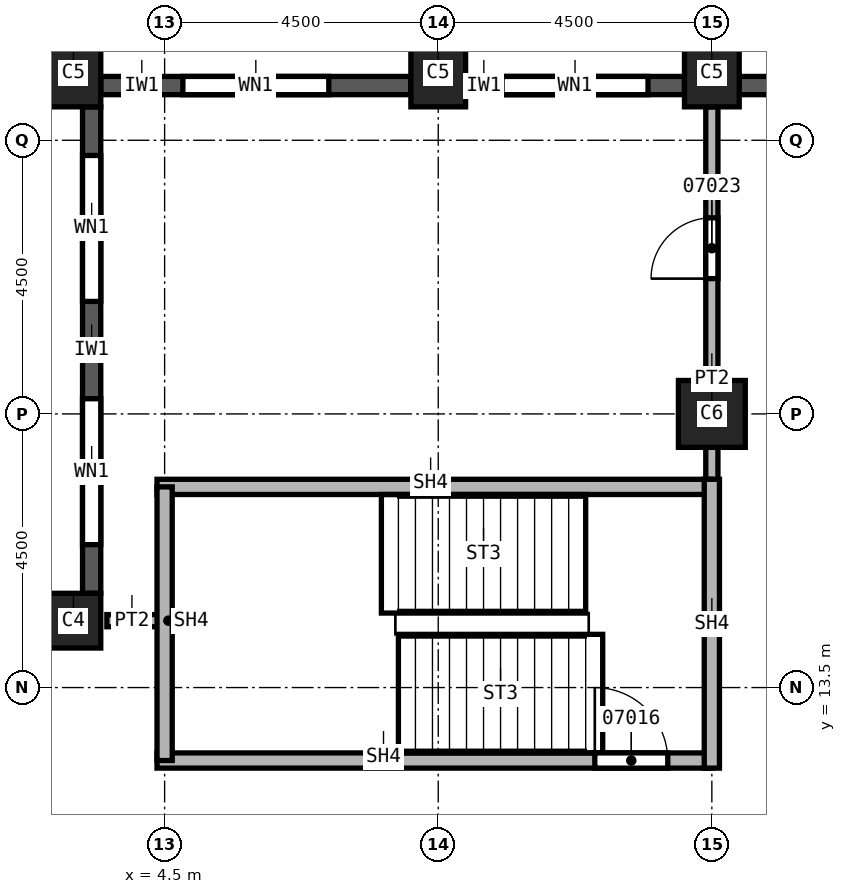
"""IFC4 building model, lengths in metres.
Left out: names, types, materials, properties, quantities, classifications, styles, units other than length and angle.
Written with IfcOpenShell. Run it as: python <this file> out.ifc"""

import sys

from ifc_helpers import new_model, si_unit, direction, frame, frame_2d, origin, origin_2d, place, context, subcontext, project, spatial, rectangle, extrude, element, fill, save


model = new_model("IFC4")
c1 = context("Model", 3, precision=1e-05, world=origin(), true_north=direction((0.0, 1.0)))
c2 = subcontext(c1, "Body", "Model", "MODEL_VIEW")
j1 = project(units=[si_unit("LENGTHUNIT", "METRE"), si_unit("PLANEANGLEUNIT", "RADIAN")], contexts=[c1])
p1 = place(None, origin())
s1 = spatial("IfcSite", under=j1, at=p1, CompositionType="ELEMENT")
p2 = place(p1, origin())
s2 = spatial("IfcBuilding", under=s1, at=p2, CompositionType="ELEMENT")
p3 = place(p2, frame((0.0, 0.0, 138.0)))
s3 = spatial("IfcBuildingStorey", under=s2, at=p3, CompositionType="ELEMENT", Elevation=138.0)
p4 = place(p3, frame((13.5, 18.0, 0.0), z_axis=(0.0, 0.0, 1.0), x_axis=(1.0, 0.0, 0.0)))
e1 = element("IfcColumn", 1, at=p4, inside=s3, PredefinedType="COLUMN", context=c2, shape_type="SweptSolid", body=[
    extrude(rectangle(XDim=1.1, YDim=1.1, at=origin_2d()), origin(), (0.0, 0.0, 1.0), 3.7),
])
for number, where, z_axis, x_axis in (
    (2, (3.0, 23.6, 0.0), (0.0, 0.0, 1.0), (1.0, 0.0, 0.0)),
    (3, (9.0, 23.6, 0.0), (0.0, 0.0, 1.0), (1.0, 0.0, 0.0)),
    (4, (13.5, 23.6, 0.0), (0.0, 0.0, 1.0), (1.0, 0.0, 0.0)),
):
    element("IfcColumn", number, at=place(p3, frame(where, z_axis=z_axis, x_axis=x_axis)), inside=s3, PredefinedType="COLUMN", context=c2, shape_type="SweptSolid", body=[
        extrude(rectangle(XDim=0.9, YDim=1.1, at=origin_2d()), origin(), (0.0, 0.0, 1.0), 3.7),
    ])
p5 = place(p3, frame((3.0, 14.6, 0.0), z_axis=(0.0, 0.0, 1.0), x_axis=(1.0, 0.0, 0.0)))
e5 = element("IfcColumn", 5, at=p5, inside=s3, PredefinedType="COLUMN", context=c2, shape_type="SweptSolid", body=[
    extrude(rectangle(XDim=0.9, YDim=0.9, at=origin_2d()), origin(), (0.0, 0.0, 1.0), 3.7),
])
p6 = place(p3, frame((17.55, 23.4, 0.0), z_axis=(0.0, 0.0, 1.0), x_axis=(-1.0, 0.0, 0.0)))
e6 = element("IfcWall", 6, at=p6, inside=s3, PredefinedType="SOLIDWALL", context=c2, shape_type="SweptSolid", body=[
    extrude(rectangle(XDim=3.6, YDim=0.3, at=frame_2d((1.8, 0.0))), origin(), (0.0, 0.0, 1.0), 3.1),
])
p7 = place(p6, frame((0.775, 0.0, 0.8)))
e7 = element("IfcOpeningElement", 7, at=p7, cuts=e6, PredefinedType="OPENING", context=c2, shape_type="SweptSolid", body=[
    extrude(rectangle(XDim=1.0, YDim=1.95, at=frame_2d((0.5, 0.975))), frame((0.0, 0.15, 0.0), z_axis=(0.0, -1.0, 0.0), x_axis=(1.0, 0.0, 0.0)), (0.0, 0.0, 1.0), 0.3),
])
p8 = place(p6, frame((2.375, 0.0, 0.8)))
e8 = element("IfcOpeningElement", 8, at=p8, cuts=e6, PredefinedType="OPENING", context=c2, shape_type="SweptSolid", body=[
    extrude(rectangle(XDim=0.6, YDim=1.95, at=frame_2d((0.3, 0.975))), frame((0.0, 0.15, 0.0), z_axis=(0.0, -1.0, 0.0), x_axis=(1.0, 0.0, 0.0)), (0.0, 0.0, 1.0), 0.3),
])
p9 = place(p3, frame((13.05, 23.4, 0.0), z_axis=(0.0, 0.0, 1.0), x_axis=(-1.0, 0.0, 0.0)))
e9 = element("IfcWall", 9, at=p9, inside=s3, PredefinedType="SOLIDWALL", context=c2, shape_type="SweptSolid", body=[
    extrude(rectangle(XDim=3.6, YDim=0.3, at=frame_2d((1.8, 0.0))), origin(), (0.0, 0.0, 1.0), 3.1),
])
p10 = place(p9, frame((0.6, 0.0, 0.8)))
e10 = element("IfcOpeningElement", 10, at=p10, cuts=e9, PredefinedType="OPENING", context=c2, shape_type="SweptSolid", body=[
    extrude(rectangle(XDim=2.4, YDim=1.95, at=frame_2d((1.2, 0.975))), frame((0.0, 0.15, 0.0), z_axis=(0.0, -1.0, 0.0), x_axis=(1.0, 0.0, 0.0)), (0.0, 0.0, 1.0), 0.3),
])
p11 = place(p3, frame((8.55, 23.4, 0.0), z_axis=(0.0, 0.0, 1.0), x_axis=(-1.0, 0.0, 0.0)))
e11 = element("IfcWall", 11, at=p11, inside=s3, PredefinedType="SOLIDWALL", context=c2, shape_type="SweptSolid", body=[
    extrude(rectangle(XDim=5.1, YDim=0.3, at=frame_2d((2.55, 0.0))), origin(), (0.0, 0.0, 1.0), 3.1),
])
p12 = place(p11, frame((1.35, 0.0, 0.8)))
e12 = element("IfcOpeningElement", 12, at=p12, cuts=e11, PredefinedType="OPENING", context=c2, shape_type="SweptSolid", body=[
    extrude(rectangle(XDim=2.4, YDim=1.95, at=frame_2d((1.2, 0.975))), frame((0.0, 0.15, 0.0), z_axis=(0.0, -1.0, 0.0), x_axis=(1.0, 0.0, 0.0)), (0.0, 0.0, 1.0), 0.3),
])
p13 = place(p3, frame((3.3, 23.05, 0.0), z_axis=(0.0, 0.0, 1.0), x_axis=(0.0, -1.0, 0.0)))
e13 = element("IfcWall", 13, at=p13, inside=s3, PredefinedType="SOLIDWALL", context=c2, shape_type="SweptSolid", body=[
    extrude(rectangle(XDim=8.0, YDim=0.3, at=frame_2d((4.0, 0.0))), origin(), (0.0, 0.0, 1.0), 3.1),
])
p14 = place(p13, frame((0.8, 0.0, 0.8)))
e14 = element("IfcOpeningElement", 14, at=p14, cuts=e13, PredefinedType="OPENING", context=c2, shape_type="SweptSolid", body=[
    extrude(rectangle(XDim=2.4, YDim=1.95, at=frame_2d((1.2, 0.975))), frame((0.0, 0.15, 0.0), z_axis=(0.0, -1.0, 0.0), x_axis=(1.0, 0.0, 0.0)), (0.0, 0.0, 1.0), 0.3),
])
p15 = place(p13, frame((4.8, 0.0, 0.8)))
e15 = element("IfcOpeningElement", 15, at=p15, cuts=e13, PredefinedType="OPENING", context=c2, shape_type="SweptSolid", body=[
    extrude(rectangle(XDim=2.4, YDim=1.95, at=frame_2d((1.2, 0.975))), frame((0.0, 0.15, 0.0), z_axis=(0.0, -1.0, 0.0), x_axis=(1.0, 0.0, 0.0)), (0.0, 0.0, 1.0), 0.3),
])
p16 = place(p3, frame((3.55, 14.6, 0.0), z_axis=(0.0, 0.0, 1.0), x_axis=(1.0, 0.0, 0.0)))
e16 = element("IfcWall", 16, at=p16, inside=s3, PredefinedType="PARTITIONING", context=c2, shape_type="SweptSolid", body=[
    extrude(rectangle(XDim=0.95, YDim=0.2, at=frame_2d((0.475, 0.0))), origin(), (0.0, 0.0, 1.0), 3.7),
])
p17 = place(p3, frame((13.5, 16.675, 0.0), z_axis=(0.0, 0.0, 1.0), x_axis=(0.0, 1.0, 0.0)))
e17 = element("IfcWall", 17, at=p17, inside=s3, PredefinedType="PARTITIONING", context=c2, shape_type="SweptSolid", body=[
    extrude(rectangle(XDim=6.375, YDim=0.2, at=frame_2d((3.188, 0.0))), origin(), (0.0, 0.0, 1.0), 3.7),
])
p18 = place(p17, frame((3.55, 0.0, 0.0)))
e18 = element("IfcOpeningElement", 18, at=p18, cuts=e17, PredefinedType="OPENING", context=c2, shape_type="SweptSolid", body=[
    extrude(rectangle(XDim=1.0, YDim=2.1, at=frame_2d((0.5, 1.05))), frame((0.0, 0.1, 0.0), z_axis=(0.0, -1.0, 0.0), x_axis=(1.0, 0.0, 0.0)), (0.0, 0.0, 1.0), 0.2),
])
p19 = place(p3, frame((4.375, 12.3, 0.0), z_axis=(0.0, 0.0, 1.0), x_axis=(1.0, 0.0, 0.0)))
e19 = element("IfcWall", 19, at=p19, inside=s3, PredefinedType="SOLIDWALL", context=c2, shape_type="SweptSolid", body=[
    extrude(rectangle(XDim=9.125, YDim=0.25, at=frame_2d((4.562, 0.0))), origin(), (0.0, 0.0, 1.0), 3.7),
])
p20 = place(p19, frame((7.2, 0.0, 0.0)))
e20 = element("IfcOpeningElement", 20, at=p20, cuts=e19, PredefinedType="OPENING", context=c2, shape_type="SweptSolid", body=[
    extrude(rectangle(XDim=1.2, YDim=2.1, at=frame_2d((0.6, 1.05))), frame((0.0, 0.125, 0.0), z_axis=(0.0, -1.0, 0.0), x_axis=(1.0, 0.0, 0.0)), (0.0, 0.0, 1.0), 0.25),
])
p21 = place(p3, frame((4.375, 16.8, 0.0), z_axis=(0.0, 0.0, 1.0), x_axis=(1.0, 0.0, 0.0)))
e21 = element("IfcWall", 21, at=p21, inside=s3, PredefinedType="SOLIDWALL", context=c2, shape_type="SweptSolid", body=[
    extrude(rectangle(XDim=9.125, YDim=0.25, at=frame_2d((4.562, 0.0))), origin(), (0.0, 0.0, 1.0), 3.7),
])
p22 = place(p3, frame((4.5, 12.3, 0.0), z_axis=(0.0, 0.0, 1.0), x_axis=(0.0, 1.0, 0.0)))
e22 = element("IfcWall", 22, at=p22, inside=s3, PredefinedType="SOLIDWALL", context=c2, shape_type="SweptSolid", body=[
    extrude(rectangle(XDim=4.5, YDim=0.25, at=frame_2d((2.25, 0.0))), origin(), (0.0, 0.0, 1.0), 3.7),
])
p23 = place(p3, frame((13.5, 12.175, 0.0), z_axis=(0.0, 0.0, 1.0), x_axis=(0.0, 1.0, 0.0)))
e23 = element("IfcWall", 23, at=p23, inside=s3, PredefinedType="SOLIDWALL", context=c2, shape_type="SweptSolid", body=[
    extrude(rectangle(XDim=4.75, YDim=0.25, at=frame_2d((2.375, 0.0))), origin(), (0.0, 0.0, 1.0), 3.7),
])
p24 = place(p10, origin())
e24 = element("IfcWindow", 24, at=p24, inside=s3, PartitioningType="SINGLE_PANEL", PredefinedType="WINDOW", context=c2, shape_type="SweptSolid", body=[
    extrude(rectangle(XDim=2.4, YDim=1.95, at=frame_2d((1.2, 0.975))), frame((0.0, 0.03, 0.0), z_axis=(0.0, -1.0, 0.0), x_axis=(1.0, 0.0, 0.0)), (0.0, 0.0, 1.0), 0.06),
])
fill(e10, e24)
p25 = place(p12, origin())
e25 = element("IfcWindow", 25, at=p25, inside=s3, PartitioningType="SINGLE_PANEL", PredefinedType="WINDOW", context=c2, shape_type="SweptSolid", body=[
    extrude(rectangle(XDim=2.4, YDim=1.95, at=frame_2d((1.2, 0.975))), frame((0.0, 0.03, 0.0), z_axis=(0.0, -1.0, 0.0), x_axis=(1.0, 0.0, 0.0)), (0.0, 0.0, 1.0), 0.06),
])
fill(e12, e25)
p26 = place(p14, origin())
e26 = element("IfcWindow", 26, at=p26, inside=s3, PartitioningType="SINGLE_PANEL", PredefinedType="WINDOW", context=c2, shape_type="SweptSolid", body=[
    extrude(rectangle(XDim=2.4, YDim=1.95, at=frame_2d((1.2, 0.975))), frame((0.0, 0.03, 0.0), z_axis=(0.0, -1.0, 0.0), x_axis=(1.0, 0.0, 0.0)), (0.0, 0.0, 1.0), 0.06),
])
fill(e14, e26)
p27 = place(p15, origin())
e27 = element("IfcWindow", 27, at=p27, inside=s3, PartitioningType="SINGLE_PANEL", PredefinedType="WINDOW", context=c2, shape_type="SweptSolid", body=[
    extrude(rectangle(XDim=2.4, YDim=1.95, at=frame_2d((1.2, 0.975))), frame((0.0, 0.03, 0.0), z_axis=(0.0, -1.0, 0.0), x_axis=(1.0, 0.0, 0.0)), (0.0, 0.0, 1.0), 0.06),
])
fill(e15, e27)
p28 = place(p20, origin())
e28 = element("IfcDoor", 28, at=p28, inside=s3, OperationType="SINGLE_SWING_LEFT", PredefinedType="DOOR", context=c2, shape_type="SweptSolid", body=[
    extrude(rectangle(XDim=1.2, YDim=2.1, at=frame_2d((0.6, 1.05))), frame((0.0, 0.025, 0.0), z_axis=(0.0, -1.0, 0.0), x_axis=(1.0, 0.0, 0.0)), (0.0, 0.0, 1.0), 0.05),
])
fill(e20, e28)
p29 = place(p18, origin())
e29 = element("IfcDoor", 29, at=p29, inside=s3, OperationType="SINGLE_SWING_RIGHT", PredefinedType="DOOR", context=c2, shape_type="SweptSolid", body=[
    extrude(rectangle(XDim=1.0, YDim=2.1, at=frame_2d((0.5, 1.05))), frame((0.0, 0.025, 0.0), z_axis=(0.0, -1.0, 0.0), x_axis=(1.0, 0.0, 0.0)), (0.0, 0.0, 1.0), 0.05),
])
fill(e18, e29)
save(model, sys.argv[1])
